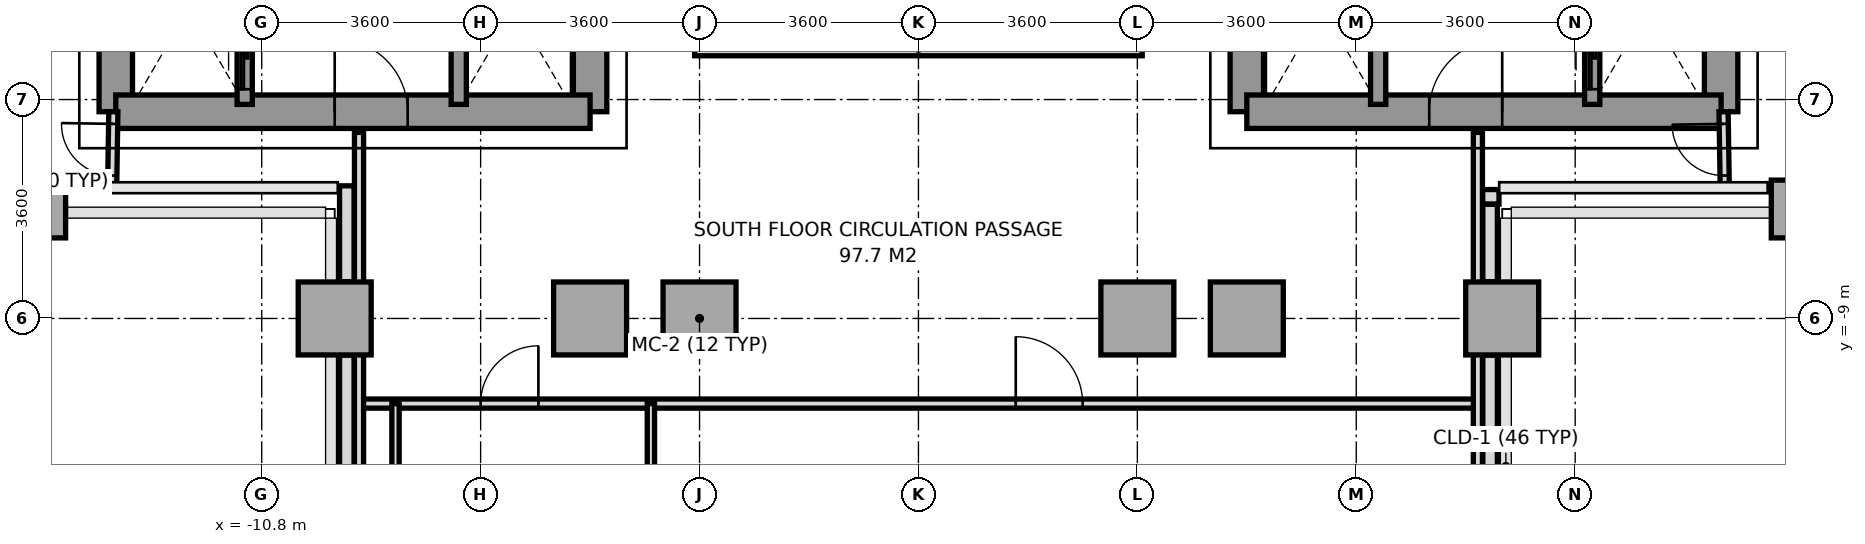
"""IFC4 building model, lengths in metres.
Left out: names, types, materials, properties, quantities, classifications, styles, units other than length and angle.
Written with IfcOpenShell. Run it as: python <this file> out.ifc"""

import sys

from ifc_helpers import new_model, si_unit, direction, frame, frame_2d, origin, origin_2d, place, context, subcontext, project, spatial, rectangle, extrude, source, transform, mapped, element, fill, save


model = new_model("IFC4")
c1 = context("Model", 3, precision=1e-05, world=origin(), true_north=direction((0.0, 1.0)))
c2 = subcontext(c1, "Body", "Model", "MODEL_VIEW")
j1 = project(units=[si_unit("LENGTHUNIT", "METRE"), si_unit("PLANEANGLEUNIT", "RADIAN")], contexts=[c1])
p1 = place(None, origin())
s1 = spatial("IfcSite", under=j1, at=p1, CompositionType="ELEMENT")
p2 = place(p1, origin())
s2 = spatial("IfcBuilding", under=s1, at=p2, CompositionType="ELEMENT")
p3 = place(p2, frame((0.0, 0.0, 40.8)))
s3 = spatial("IfcBuildingStorey", under=s2, at=p3, CompositionType="ELEMENT", Elevation=40.8)
m1 = source(origin(), c2, "Body", "SweptSolid", [
    extrude(rectangle(XDim=0.75, YDim=0.95, at=origin_2d()), origin(), (0.0, 0.0, 1.0), 3.2),
])
p4 = place(p3, frame((-14.4, -7.2, 0.0), z_axis=(0.0, 0.0, 1.0), x_axis=(1.0, 0.0, 0.0)))
e1 = element("IfcColumn", 1, at=p4, inside=s3, PredefinedType="COLUMN", context=c2, shape_type="MappedRepresentation", body=[
    mapped(m1, transform((0.0, 0.0, 0.0), x_axis=(1.0, 0.0, 0.0), y_axis=(0.0, 1.0, 0.0), z_axis=(0.0, 0.0, 1.0), scale=1.0)),
])
m2 = source(origin(), c2, "Body", "SweptSolid", [
    extrude(rectangle(XDim=1.2, YDim=1.2, at=origin_2d()), origin(), (0.0, 0.0, 1.0), 3.2),
])
for number, where, z_axis, x_axis in (
    (2, (-9.6, -9.0, 0.0), (0.0, 0.0, 1.0), (1.0, 0.0, 0.0)),
    (3, (-5.4, -9.0, 0.0), (0.0, 0.0, 1.0), (1.0, 0.0, 0.0)),
    (4, (-3.6, -9.0, 0.0), (0.0, 0.0, 1.0), (1.0, 0.0, 0.0)),
    (5, (3.6, -9.0, 0.0), (0.0, 0.0, 1.0), (1.0, 0.0, 0.0)),
    (6, (5.4, -9.0, 0.0), (0.0, 0.0, 1.0), (1.0, 0.0, 0.0)),
    (7, (9.6, -9.0, 0.0), (0.0, 0.0, 1.0), (1.0, 0.0, 0.0)),
):
    element("IfcColumn", number, at=place(p3, frame(where, z_axis=z_axis, x_axis=x_axis)), inside=s3, PredefinedType="COLUMN", context=c2, shape_type="MappedRepresentation", body=[
        mapped(m2, transform((0.0, 0.0, 0.0), x_axis=(1.0, 0.0, 0.0), y_axis=(0.0, 1.0, 0.0), z_axis=(0.0, 0.0, 1.0), scale=1.0)),
    ])
p5 = place(p3, frame((14.4, -7.2, 0.0), z_axis=(0.0, 0.0, 1.0), x_axis=(1.0, 0.0, 0.0)))
e8 = element("IfcColumn", 8, at=p5, inside=s3, PredefinedType="COLUMN", context=c2, shape_type="MappedRepresentation", body=[
    mapped(m1, transform((0.0, 0.0, 0.0), x_axis=(1.0, 0.0, 0.0), y_axis=(0.0, 1.0, 0.0), z_axis=(0.0, 0.0, 1.0), scale=1.0)),
])
p6 = place(p3, frame((9.547, -7.0, 0.0), z_axis=(0.0, 0.0, 1.0), x_axis=(-1.0, 0.0, 0.0)))
e9 = element("IfcWall", 9, at=p6, inside=s3, PredefinedType="PARAPET", context=c2, shape_type="SweptSolid", body=[
    extrude(rectangle(XDim=0.269, YDim=0.24, at=frame_2d((0.135, 0.0))), origin(), (0.0, 0.0, 1.0), 1.15),
])
p7 = place(p3, frame((9.4, -7.123, 0.0), z_axis=(0.0, 0.0, 1.0), x_axis=(0.0, -1.0, 0.0)))
e10 = element("IfcWall", 10, at=p7, inside=s3, PredefinedType="PARAPET", context=c2, shape_type="SweptSolid", body=[
    extrude(rectangle(XDim=1.274, YDim=0.24, at=frame_2d((0.637, 0.0))), origin(), (0.0, 0.0, 1.0), 1.15),
])
p8 = place(p3, frame((9.4, -9.603, 0.0), z_axis=(0.0, 0.0, 1.0), x_axis=(0.0, -1.0, 0.0)))
e11 = element("IfcWall", 11, at=p8, inside=s3, PredefinedType="PARAPET", context=c2, shape_type="SweptSolid", body=[
    extrude(rectangle(XDim=6.0, YDim=0.24, at=frame_2d((3.0, 0.0))), origin(), (0.0, 0.0, 1.0), 1.15),
])
p9 = place(p3, frame((-9.4, -15.358, 0.0), z_axis=(0.0, 0.0, 1.0), x_axis=(0.0, 1.0, 0.0)))
e12 = element("IfcWall", 12, at=p9, inside=s3, PredefinedType="PARAPET", context=c2, shape_type="SweptSolid", body=[
    extrude(rectangle(XDim=5.755, YDim=0.24, at=frame_2d((2.877, 0.0))), origin(), (0.0, 0.0, 1.0), 1.15),
])
p10 = place(p3, frame((-9.4, -8.397, 0.0), z_axis=(0.0, 0.0, 1.0), x_axis=(0.0, 1.0, 0.0)))
e13 = element("IfcWall", 13, at=p10, inside=s3, PredefinedType="PARAPET", context=c2, shape_type="SweptSolid", body=[
    extrude(rectangle(XDim=1.578, YDim=0.24, at=frame_2d((0.789, 0.0))), origin(), (0.0, 0.0, 1.0), 1.15),
])
p11 = place(p3, frame((-13.2, -5.6, 0.0), z_axis=(0.0, 0.0, 1.0), x_axis=(0.0, 1.0, 0.0)))
e14 = element("IfcWall", 14, at=p11, inside=s3, PredefinedType="SHEAR", context=c2, shape_type="SweptSolid", body=[
    extrude(rectangle(XDim=11.2, YDim=0.55, at=frame_2d((5.6, 0.0))), origin(), (0.0, 0.0, 1.0), 3.2),
])
p12 = place(p3, frame((-5.4, -5.6, 0.0), z_axis=(0.0, 0.0, 1.0), x_axis=(0.0, 1.0, 0.0)))
e15 = element("IfcWall", 15, at=p12, inside=s3, PredefinedType="SHEAR", context=c2, shape_type="SweptSolid", body=[
    extrude(rectangle(XDim=12.5, YDim=0.55, at=frame_2d((6.25, 0.0))), origin(), (0.0, 0.0, 1.0), 3.2),
])
p13 = place(p12, frame((4.55, 0.0, 0.0)))
e16 = element("IfcOpeningElement", 16, at=p13, cuts=e15, PredefinedType="OPENING", context=c2, shape_type="SweptSolid", body=[
    extrude(rectangle(XDim=1.2, YDim=2.2, at=frame_2d((0.6, 1.1))), frame((0.0, 0.285, 0.0), z_axis=(0.0, -1.0, 0.0), x_axis=(1.0, 0.0, 0.0)), (0.0, 0.0, 1.0), 0.57),
])
p14 = place(p12, frame((6.86, 0.0, 0.0)))
e17 = element("IfcOpeningElement", 17, at=p14, cuts=e15, PredefinedType="OPENING", context=c2, shape_type="SweptSolid", body=[
    extrude(rectangle(XDim=0.8, YDim=2.1, at=frame_2d((0.4, 1.05))), frame((0.0, 0.285, 0.0), z_axis=(0.0, -1.0, 0.0), x_axis=(1.0, 0.0, 0.0)), (0.0, 0.0, 1.0), 0.57),
])
p15 = place(p12, frame((7.88, 0.0, 0.0)))
e18 = element("IfcOpeningElement", 18, at=p15, cuts=e15, PredefinedType="OPENING", context=c2, shape_type="SweptSolid", body=[
    extrude(rectangle(XDim=0.8, YDim=2.1, at=frame_2d((0.4, 1.05))), frame((0.0, 0.285, 0.0), z_axis=(0.0, -1.0, 0.0), x_axis=(1.0, 0.0, 0.0)), (0.0, 0.0, 1.0), 0.57),
])
p16 = place(p3, frame((-13.2, -5.6, 0.0), z_axis=(0.0, 0.0, 1.0), x_axis=(1.0, 0.0, 0.0)))
e19 = element("IfcWall", 19, at=p16, inside=s3, PredefinedType="SHEAR", context=c2, shape_type="SweptSolid", body=[
    extrude(rectangle(XDim=7.8, YDim=0.55, at=frame_2d((3.9, 0.0))), origin(), (0.0, 0.0, 1.0), 3.2),
])
p17 = place(p16, frame((3.6, 0.0, 0.0)))
e20 = element("IfcOpeningElement", 20, at=p17, cuts=e19, PredefinedType="OPENING", context=c2, shape_type="SweptSolid", body=[
    extrude(rectangle(XDim=1.2, YDim=2.2, at=frame_2d((0.6, 1.1))), frame((0.0, 0.285, 0.0), z_axis=(0.0, -1.0, 0.0), x_axis=(1.0, 0.0, 0.0)), (0.0, 0.0, 1.0), 0.57),
])
p18 = place(p3, frame((13.2, -5.6, 0.0), z_axis=(0.0, 0.0, 1.0), x_axis=(0.0, 1.0, 0.0)))
e21 = element("IfcWall", 21, at=p18, inside=s3, PredefinedType="SHEAR", context=c2, shape_type="SweptSolid", body=[
    extrude(rectangle(XDim=11.2, YDim=0.55, at=frame_2d((5.6, 0.0))), origin(), (0.0, 0.0, 1.0), 3.2),
])
p19 = place(p3, frame((5.4, -5.6, 0.0), z_axis=(0.0, 0.0, 1.0), x_axis=(0.0, 1.0, 0.0)))
e22 = element("IfcWall", 22, at=p19, inside=s3, PredefinedType="SHEAR", context=c2, shape_type="SweptSolid", body=[
    extrude(rectangle(XDim=12.5, YDim=0.55, at=frame_2d((6.25, 0.0))), origin(), (0.0, 0.0, 1.0), 3.2),
])
p20 = place(p19, frame((4.55, 0.0, 0.0)))
e23 = element("IfcOpeningElement", 23, at=p20, cuts=e22, PredefinedType="OPENING", context=c2, shape_type="SweptSolid", body=[
    extrude(rectangle(XDim=1.2, YDim=2.2, at=frame_2d((0.6, 1.1))), frame((0.0, 0.285, 0.0), z_axis=(0.0, -1.0, 0.0), x_axis=(1.0, 0.0, 0.0)), (0.0, 0.0, 1.0), 0.57),
])
p21 = place(p3, frame((5.4, -5.6, 0.0), z_axis=(0.0, 0.0, 1.0), x_axis=(1.0, 0.0, 0.0)))
e24 = element("IfcWall", 24, at=p21, inside=s3, PredefinedType="SHEAR", context=c2, shape_type="SweptSolid", body=[
    extrude(rectangle(XDim=7.8, YDim=0.55, at=frame_2d((3.9, 0.0))), origin(), (0.0, 0.0, 1.0), 3.2),
])
p22 = place(p21, frame((3.0, 0.0, 0.0)))
e25 = element("IfcOpeningElement", 25, at=p22, cuts=e24, PredefinedType="OPENING", context=c2, shape_type="SweptSolid", body=[
    extrude(rectangle(XDim=1.2, YDim=2.2, at=frame_2d((0.6, 1.1))), frame((0.0, 0.285, 0.0), z_axis=(0.0, -1.0, 0.0), x_axis=(1.0, 0.0, 0.0)), (0.0, 0.0, 1.0), 0.57),
])
p23 = place(p3, frame((-11.08, -5.48, 0.0), z_axis=(0.0, 0.0, 1.0), x_axis=(0.0, 1.0, 0.0)))
e26 = element("IfcWall", 26, at=p23, inside=s3, PredefinedType="SOLIDWALL", context=c2, shape_type="SweptSolid", body=[
    extrude(rectangle(XDim=1.6, YDim=0.25, at=frame_2d((0.8, 0.0))), origin(), (0.0, 0.0, 1.0), 3.2),
])
p24 = place(p23, frame((0.25, 0.0, 0.0)))
e27 = element("IfcOpeningElement", 27, at=p24, cuts=e26, PredefinedType="OPENING", context=c2, shape_type="SweptSolid", body=[
    extrude(rectangle(XDim=1.1, YDim=2.2, at=frame_2d((0.55, 1.1))), frame((0.0, 0.135, 0.0), z_axis=(0.0, -1.0, 0.0), x_axis=(1.0, 0.0, 0.0)), (0.0, 0.0, 1.0), 0.27),
])
p25 = place(p3, frame((11.08, -5.48, 0.0), z_axis=(0.0, 0.0, 1.0), x_axis=(0.0, 1.0, 0.0)))
e28 = element("IfcWall", 28, at=p25, inside=s3, PredefinedType="SOLIDWALL", context=c2, shape_type="SweptSolid", body=[
    extrude(rectangle(XDim=1.6, YDim=0.25, at=frame_2d((0.8, 0.0))), origin(), (0.0, 0.0, 1.0), 3.2),
])
p26 = place(p25, frame((0.25, 0.0, 0.0)))
e29 = element("IfcOpeningElement", 29, at=p26, cuts=e28, PredefinedType="OPENING", context=c2, shape_type="SweptSolid", body=[
    extrude(rectangle(XDim=1.1, YDim=2.2, at=frame_2d((0.55, 1.1))), frame((0.0, 0.135, 0.0), z_axis=(0.0, -1.0, 0.0), x_axis=(1.0, 0.0, 0.0)), (0.0, 0.0, 1.0), 0.27),
])
for number, where, z_axis, x_axis in (
    (30, (-7.56, -5.48, 0.0), (0.0, 0.0, 1.0), (0.0, 1.0, 0.0)),
    (31, (7.56, -5.48, 0.0), (0.0, 0.0, 1.0), (0.0, 1.0, 0.0)),
):
    element("IfcWall", number, at=place(p3, frame(where, z_axis=z_axis, x_axis=x_axis)), inside=s3, PredefinedType="SOLIDWALL", context=c2, shape_type="SweptSolid", body=[
        extrude(rectangle(XDim=1.6, YDim=0.25, at=frame_2d((0.8, 0.0))), origin(), (0.0, 0.0, 1.0), 3.2),
    ])
p27 = place(p3, frame((-9.2, -10.4, 0.0), z_axis=(0.0, 0.0, 1.0), x_axis=(1.0, 0.0, 0.0)))
e32 = element("IfcWall", 32, at=p27, inside=s3, PredefinedType="PARTITIONING", context=c2, shape_type="SweptSolid", body=[
    extrude(rectangle(XDim=18.4, YDim=0.15, at=frame_2d((9.2, 0.0))), origin(), (0.0, 0.0, 1.0), 3.2),
])
p28 = place(p27, frame((2.0, 0.0, 0.0)))
e33 = element("IfcOpeningElement", 33, at=p28, cuts=e32, PredefinedType="OPENING", context=c2, shape_type="SweptSolid", body=[
    extrude(rectangle(XDim=0.95, YDim=2.15, at=frame_2d((0.475, 1.075))), frame((0.0, 0.085, 0.0), z_axis=(0.0, -1.0, 0.0), x_axis=(1.0, 0.0, 0.0)), (0.0, 0.0, 1.0), 0.17),
])
p29 = place(p27, frame((10.8, 0.0, 0.0)))
e34 = element("IfcOpeningElement", 34, at=p29, cuts=e32, PredefinedType="OPENING", context=c2, shape_type="SweptSolid", body=[
    extrude(rectangle(XDim=1.1, YDim=2.2, at=frame_2d((0.55, 1.1))), frame((0.0, 0.085, 0.0), z_axis=(0.0, -1.0, 0.0), x_axis=(1.0, 0.0, 0.0)), (0.0, 0.0, 1.0), 0.17),
])
for number, where, z_axis, x_axis in (
    (35, (-9.2, -15.68, 0.0), (0.0, 0.0, 1.0), (0.0, 1.0, 0.0)),
    (36, (9.2, -15.68, 0.0), (0.0, 0.0, 1.0), (0.0, 1.0, 0.0)),
):
    element("IfcWall", number, at=place(p3, frame(where, z_axis=z_axis, x_axis=x_axis)), inside=s3, PredefinedType="PARTITIONING", context=c2, shape_type="SweptSolid", body=[
        extrude(rectangle(XDim=9.74, YDim=0.15, at=frame_2d((4.87, 0.0))), origin(), (0.0, 0.0, 1.0), 2.71),
    ])
for number, where, z_axis, x_axis in (
    (37, (-8.6, -14.0, 0.0), (0.0, 0.0, 1.0), (0.0, 1.0, 0.0)),
    (38, (-4.4, -14.0, 0.0), (0.0, 0.0, 1.0), (0.0, 1.0, 0.0)),
):
    element("IfcWall", number, at=place(p3, frame(where, z_axis=z_axis, x_axis=x_axis)), inside=s3, PredefinedType="PARTITIONING", context=c2, shape_type="SweptSolid", body=[
        extrude(rectangle(XDim=3.6, YDim=0.12, at=frame_2d((1.8, 0.0))), origin(), (0.0, 0.0, 1.0), 3.2),
    ])
p30 = place(p3, frame((-13.26, -6.85, 0.0), z_axis=(0.0, 0.0, 1.0), x_axis=(0.016013571389, 0.999871774545, 0.0)))
e39 = element("IfcWall", 39, at=p30, inside=s3, PredefinedType="PARTITIONING", context=c2, shape_type="SweptSolid", body=[
    extrude(rectangle(XDim=1.25, YDim=0.15, at=frame_2d((0.625, 0.0))), origin(), (0.0, 0.0, 1.0), 3.2),
])
p31 = place(p30, frame((0.2, 0.0, 0.0)))
e40 = element("IfcOpeningElement", 40, at=p31, cuts=e39, PredefinedType="OPENING", context=c2, shape_type="SweptSolid", body=[
    extrude(rectangle(XDim=0.85, YDim=2.1, at=frame_2d((0.425, 1.05))), frame((0.0, 0.085, 0.0), z_axis=(0.0, -1.0, 0.0), x_axis=(1.0, 0.0, 0.0)), (0.0, 0.0, 1.0), 0.17),
])
p32 = place(p3, frame((13.26, -6.85, 0.0), z_axis=(0.0, 0.0, 1.0), x_axis=(-0.016013571389, 0.999871774545, 0.0)))
e41 = element("IfcWall", 41, at=p32, inside=s3, PredefinedType="PARTITIONING", context=c2, shape_type="SweptSolid", body=[
    extrude(rectangle(XDim=1.25, YDim=0.15, at=frame_2d((0.625, 0.0))), origin(), (0.0, 0.0, 1.0), 3.2),
])
p33 = place(p32, frame((0.2, 0.0, 0.0)))
e42 = element("IfcOpeningElement", 42, at=p33, cuts=e41, PredefinedType="OPENING", context=c2, shape_type="SweptSolid", body=[
    extrude(rectangle(XDim=0.85, YDim=2.1, at=frame_2d((0.425, 1.05))), frame((0.0, 0.085, 0.0), z_axis=(0.0, -1.0, 0.0), x_axis=(1.0, 0.0, 0.0)), (0.0, 0.0, 1.0), 0.17),
])
p34 = place(p3, frame((-3.68, -4.56, 0.0), z_axis=(0.0, 0.0, 1.0), x_axis=(1.0, 0.0, 0.0)))
e43 = element("IfcWall", 43, at=p34, inside=s3, PredefinedType="PARAPET", context=c2, shape_type="SweptSolid", body=[
    extrude(rectangle(XDim=7.36, YDim=0.24, at=frame_2d((3.68, 0.0))), origin(), (0.0, 0.0, 1.0), 1.15),
])
m3 = source(origin(), c2, "Body", "SweptSolid", [
    extrude(rectangle(XDim=1.2, YDim=2.2, at=frame_2d((0.6, 1.1))), frame((0.0, 0.025, 0.0), z_axis=(0.0, -1.0, 0.0), x_axis=(1.0, 0.0, 0.0)), (0.0, 0.0, 1.0), 0.05),
])
p35 = place(p17, origin())
e44 = element("IfcDoor", 44, at=p35, inside=s3, OperationType="SINGLE_SWING_LEFT", PredefinedType="DOOR", context=c2, shape_type="MappedRepresentation", body=[
    mapped(m3, transform((0.0, 0.0, 0.0), x_axis=(1.0, 0.0, 0.0), y_axis=(0.0, 1.0, 0.0), z_axis=(0.0, 0.0, 1.0), scale=1.0)),
])
fill(e20, e44)
p36 = place(p22, origin())
e45 = element("IfcDoor", 45, at=p36, inside=s3, OperationType="SINGLE_SWING_RIGHT", PredefinedType="DOOR", context=c2, shape_type="MappedRepresentation", body=[
    mapped(m3, transform((0.0, 0.0, 0.0), x_axis=(1.0, 0.0, 0.0), y_axis=(0.0, 1.0, 0.0), z_axis=(0.0, 0.0, 1.0), scale=1.0)),
])
fill(e25, e45)
m4 = source(origin(), c2, "Body", "SweptSolid", [
    extrude(rectangle(XDim=1.1, YDim=2.2, at=frame_2d((0.55, 1.1))), frame((0.0, 0.025, 0.0), z_axis=(0.0, -1.0, 0.0), x_axis=(1.0, 0.0, 0.0)), (0.0, 0.0, 1.0), 0.05),
])
p37 = place(p24, origin())
e46 = element("IfcDoor", 46, at=p37, inside=s3, OperationType="SLIDING_TO_LEFT", PredefinedType="DOOR", context=c2, shape_type="MappedRepresentation", body=[
    mapped(m4, transform((0.0, 0.0, 0.0), x_axis=(1.0, 0.0, 0.0), y_axis=(0.0, 1.0, 0.0), z_axis=(0.0, 0.0, 1.0), scale=1.0)),
])
fill(e27, e46)
p38 = place(p26, origin())
e47 = element("IfcDoor", 47, at=p38, inside=s3, OperationType="SLIDING_TO_LEFT", PredefinedType="DOOR", context=c2, shape_type="MappedRepresentation", body=[
    mapped(m4, transform((0.0, 0.0, 0.0), x_axis=(1.0, 0.0, 0.0), y_axis=(0.0, 1.0, 0.0), z_axis=(0.0, 0.0, 1.0), scale=1.0)),
])
fill(e29, e47)
m5 = source(origin(), c2, "Body", "SweptSolid", [
    extrude(rectangle(XDim=0.95, YDim=2.15, at=frame_2d((0.475, 1.075))), frame((0.0, 0.025, 0.0), z_axis=(0.0, -1.0, 0.0), x_axis=(1.0, 0.0, 0.0)), (0.0, 0.0, 1.0), 0.05),
])
p39 = place(p28, origin())
e48 = element("IfcDoor", 48, at=p39, inside=s3, OperationType="SINGLE_SWING_RIGHT", PredefinedType="DOOR", context=c2, shape_type="MappedRepresentation", body=[
    mapped(m5, transform((0.0, 0.0, 0.0), x_axis=(1.0, 0.0, 0.0), y_axis=(0.0, 1.0, 0.0), z_axis=(0.0, 0.0, 1.0), scale=1.0)),
])
fill(e33, e48)
p40 = place(p29, origin())
e49 = element("IfcDoor", 49, at=p40, inside=s3, OperationType="SINGLE_SWING_LEFT", PredefinedType="DOOR", context=c2, shape_type="MappedRepresentation", body=[
    mapped(m4, transform((0.0, 0.0, 0.0), x_axis=(1.0, 0.0, 0.0), y_axis=(0.0, 1.0, 0.0), z_axis=(0.0, 0.0, 1.0), scale=1.0)),
])
fill(e34, e49)
m6 = source(origin(), c2, "Body", "SweptSolid", [
    extrude(rectangle(XDim=0.85, YDim=2.1, at=frame_2d((0.425, 1.05))), frame((0.0, 0.025, 0.0), z_axis=(0.0, -1.0, 0.0), x_axis=(1.0, 0.0, 0.0)), (0.0, 0.0, 1.0), 0.05),
])
p41 = place(p31, origin())
e50 = element("IfcDoor", 50, at=p41, inside=s3, OperationType="SINGLE_SWING_RIGHT", PredefinedType="DOOR", context=c2, shape_type="MappedRepresentation", body=[
    mapped(m6, transform((0.0, 0.0, 0.0), x_axis=(1.0, 0.0, 0.0), y_axis=(0.0, 1.0, 0.0), z_axis=(0.0, 0.0, 1.0), scale=1.0)),
])
fill(e40, e50)
p42 = place(p33, origin())
e51 = element("IfcDoor", 51, at=p42, inside=s3, OperationType="SINGLE_SWING_RIGHT", PredefinedType="DOOR", context=c2, shape_type="MappedRepresentation", body=[
    mapped(m6, transform((0.0, 0.0, 0.0), x_axis=(1.0, 0.0, 0.0), y_axis=(0.0, 1.0, 0.0), z_axis=(0.0, 0.0, 1.0), scale=1.0)),
])
fill(e42, e51)
save(model, sys.argv[1])
